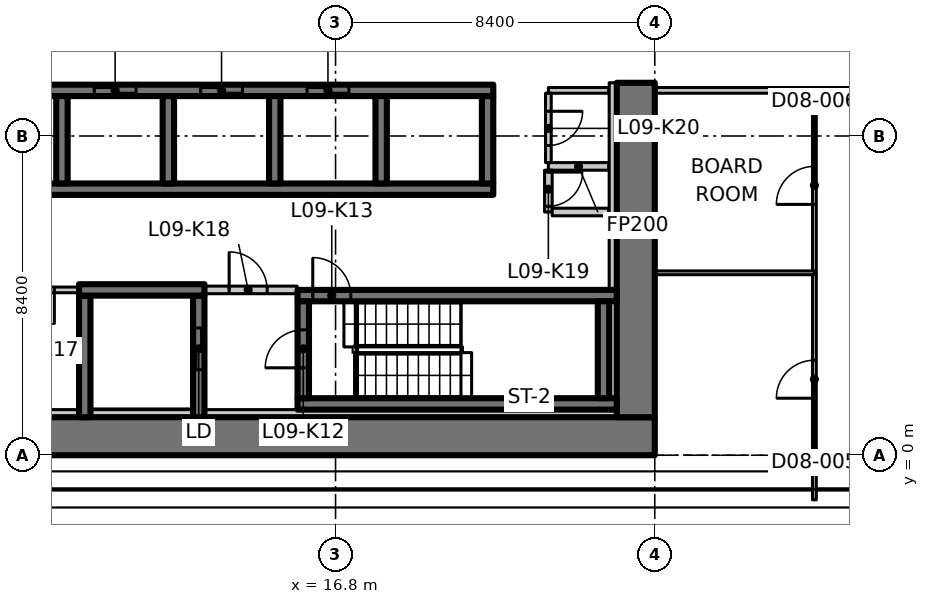
"""IFC4 building model, lengths in metres.
Left out: names, types, materials, properties, quantities, classifications, styles, units other than length and angle.
Written with IfcOpenShell. Run it as: python <this file> out.ifc"""

import sys

from ifc_helpers import new_model, si_unit, direction, frame, frame_2d, origin, place, context, subcontext, project, spatial, polyline, rectangle, outline, extrude, element, fill, save


model = new_model("IFC4")
c1 = context("Model", 3, precision=1e-05, world=origin(), true_north=direction((0.0, 1.0)))
c2 = subcontext(c1, "Body", "Model", "MODEL_VIEW")
j1 = project(units=[si_unit("LENGTHUNIT", "METRE"), si_unit("PLANEANGLEUNIT", "RADIAN")], contexts=[c1])
p1 = place(None, origin())
s1 = spatial("IfcSite", under=j1, at=p1, CompositionType="ELEMENT")
p2 = place(p1, origin())
s2 = spatial("IfcBuilding", under=s1, at=p2, CompositionType="ELEMENT")
p3 = place(p2, frame((0.0, 0.0, 47.3)))
s3 = spatial("IfcBuildingStorey", under=s2, at=p3, CompositionType="ELEMENT", Elevation=47.3)
p4 = place(p3, frame((6.936, 0.5, 0.0), z_axis=(0.0, 0.0, 1.0), x_axis=(1.0, 0.0, 0.0)))
e1 = element("IfcWall", 1, at=p4, inside=s3, PredefinedType="SHEAR", context=c2, shape_type="SweptSolid", body=[
    extrude(rectangle(XDim=18.264, YDim=1.0, at=frame_2d((9.132, 0.0))), origin(), (0.0, 0.0, 1.0), 3.35),
])
p5 = place(p3, frame((24.7, 1.0, 0.0), z_axis=(0.0, 0.0, 1.0), x_axis=(0.0, 1.0, 0.0)))
e2 = element("IfcWall", 2, at=p5, inside=s3, PredefinedType="SHEAR", context=c2, shape_type="SweptSolid", body=[
    extrude(rectangle(XDim=8.8, YDim=1.0, at=frame_2d((4.4, 0.0))), origin(), (0.0, 0.0, 1.0), 3.35),
])
p6 = place(p3, frame((1.0, 7.0, 0.0), z_axis=(0.0, 0.0, 1.0), x_axis=(1.0, 0.0, 0.0)))
e3 = element("IfcWall", 3, at=p6, inside=s3, PredefinedType="SHEAR", context=c2, shape_type="SweptSolid", body=[
    extrude(rectangle(XDim=19.95, YDim=0.3, at=frame_2d((9.975, 0.0))), origin(), (0.0, 0.0, 1.0), 3.35),
])
p7 = place(p3, frame((1.0, 9.6, 0.0), z_axis=(0.0, 0.0, 1.0), x_axis=(1.0, 0.0, 0.0)))
e4 = element("IfcWall", 4, at=p7, inside=s3, PredefinedType="SHEAR", context=c2, shape_type="SweptSolid", body=[
    extrude(rectangle(XDim=19.95, YDim=0.3, at=frame_2d((9.975, 0.0))), origin(), (0.0, 0.0, 1.0), 3.35),
])
p8 = place(p7, frame((1.05, 0.0, 0.0)))
e5 = element("IfcOpeningElement", 5, at=p8, cuts=e4, PredefinedType="OPENING", context=c2, shape_type="SweptSolid", body=[
    extrude(rectangle(XDim=1.1, YDim=2.3, at=frame_2d((0.55, 1.15))), frame((0.0, 0.16, 0.0), z_axis=(0.0, -1.0, 0.0), x_axis=(1.0, 0.0, 0.0)), (0.0, 0.0, 1.0), 0.32),
])
p9 = place(p7, frame((3.85, 0.0, 0.0)))
e6 = element("IfcOpeningElement", 6, at=p9, cuts=e4, PredefinedType="OPENING", context=c2, shape_type="SweptSolid", body=[
    extrude(rectangle(XDim=1.1, YDim=2.3, at=frame_2d((0.55, 1.15))), frame((0.0, 0.16, 0.0), z_axis=(0.0, -1.0, 0.0), x_axis=(1.0, 0.0, 0.0)), (0.0, 0.0, 1.0), 0.32),
])
p10 = place(p7, frame((6.65, 0.0, 0.0)))
e7 = element("IfcOpeningElement", 7, at=p10, cuts=e4, PredefinedType="OPENING", context=c2, shape_type="SweptSolid", body=[
    extrude(rectangle(XDim=1.1, YDim=2.3, at=frame_2d((0.55, 1.15))), frame((0.0, 0.16, 0.0), z_axis=(0.0, -1.0, 0.0), x_axis=(1.0, 0.0, 0.0)), (0.0, 0.0, 1.0), 0.32),
])
p11 = place(p7, frame((9.45, 0.0, 0.0)))
e8 = element("IfcOpeningElement", 8, at=p11, cuts=e4, PredefinedType="OPENING", context=c2, shape_type="SweptSolid", body=[
    extrude(rectangle(XDim=1.1, YDim=2.3, at=frame_2d((0.55, 1.15))), frame((0.0, 0.16, 0.0), z_axis=(0.0, -1.0, 0.0), x_axis=(1.0, 0.0, 0.0)), (0.0, 0.0, 1.0), 0.32),
])
p12 = place(p7, frame((12.25, 0.0, 0.0)))
e9 = element("IfcOpeningElement", 9, at=p12, cuts=e4, PredefinedType="OPENING", context=c2, shape_type="SweptSolid", body=[
    extrude(rectangle(XDim=1.1, YDim=2.3, at=frame_2d((0.55, 1.15))), frame((0.0, 0.16, 0.0), z_axis=(0.0, -1.0, 0.0), x_axis=(1.0, 0.0, 0.0)), (0.0, 0.0, 1.0), 0.32),
])
p13 = place(p7, frame((15.05, 0.0, 0.0)))
e10 = element("IfcOpeningElement", 10, at=p13, cuts=e4, PredefinedType="OPENING", context=c2, shape_type="SweptSolid", body=[
    extrude(rectangle(XDim=1.1, YDim=2.3, at=frame_2d((0.55, 1.15))), frame((0.0, 0.16, 0.0), z_axis=(0.0, -1.0, 0.0), x_axis=(1.0, 0.0, 0.0)), (0.0, 0.0, 1.0), 0.32),
])
for number, where, z_axis, x_axis in (
    (11, (9.6, 7.15, 0.0), (0.0, 0.0, 1.0), (0.0, 1.0, 0.0)),
    (12, (12.4, 7.15, 0.0), (0.0, 0.0, 1.0), (0.0, 1.0, 0.0)),
    (13, (15.2, 7.15, 0.0), (0.0, 0.0, 1.0), (0.0, 1.0, 0.0)),
    (14, (18.0, 7.15, 0.0), (0.0, 0.0, 1.0), (0.0, 1.0, 0.0)),
    (15, (20.8, 7.15, 0.0), (0.0, 0.0, 1.0), (0.0, 1.0, 0.0)),
):
    element("IfcWall", number, at=place(p3, frame(where, z_axis=z_axis, x_axis=x_axis)), inside=s3, PredefinedType="SHEAR", context=c2, shape_type="SweptSolid", body=[
        extrude(rectangle(XDim=2.3, YDim=0.3, at=frame_2d((1.15, 0.0))), origin(), (0.0, 0.0, 1.0), 3.35),
    ])
p14 = place(p3, frame((10.2, 1.0, 0.0), z_axis=(0.0, 0.0, 1.0), x_axis=(0.0, 1.0, 0.0)))
e16 = element("IfcWall", 16, at=p14, inside=s3, PredefinedType="SHEAR", context=c2, shape_type="SweptSolid", body=[
    extrude(rectangle(XDim=3.2, YDim=0.3, at=frame_2d((1.6, 0.0))), origin(), (0.0, 0.0, 1.0), 3.35),
])
p15 = place(p3, frame((13.2, 1.0, 0.0), z_axis=(0.0, 0.0, 1.0), x_axis=(0.0, 1.0, 0.0)))
e17 = element("IfcWall", 17, at=p15, inside=s3, PredefinedType="SHEAR", context=c2, shape_type="SweptSolid", body=[
    extrude(rectangle(XDim=3.2, YDim=0.3, at=frame_2d((1.6, 0.0))), origin(), (0.0, 0.0, 1.0), 3.35),
])
p16 = place(p15, frame((1.25, 0.0, 0.0)))
e18 = element("IfcOpeningElement", 18, at=p16, cuts=e17, PredefinedType="OPENING", context=c2, shape_type="SweptSolid", body=[
    extrude(rectangle(XDim=1.1, YDim=2.3, at=frame_2d((0.55, 1.15))), frame((0.0, 0.16, 0.0), z_axis=(0.0, -1.0, 0.0), x_axis=(1.0, 0.0, 0.0)), (0.0, 0.0, 1.0), 0.32),
])
p17 = place(p3, frame((10.05, 4.35, 0.0), z_axis=(0.0, 0.0, 1.0), x_axis=(1.0, 0.0, 0.0)))
e19 = element("IfcWall", 19, at=p17, inside=s3, PredefinedType="SHEAR", context=c2, shape_type="SweptSolid", body=[
    extrude(rectangle(XDim=3.3, YDim=0.3, at=frame_2d((1.65, 0.0))), origin(), (0.0, 0.0, 1.0), 3.35),
])
p18 = place(p3, frame((15.8, 1.35, 0.0), z_axis=(0.0, 0.0, 1.0), x_axis=(1.0, 0.0, 0.0)))
e20 = element("IfcWall", 20, at=p18, inside=s3, PredefinedType="SHEAR", context=c2, shape_type="SweptSolid", body=[
    extrude(rectangle(XDim=8.4, YDim=0.3, at=frame_2d((4.2, 0.0))), origin(), (0.0, 0.0, 1.0), 3.35),
])
p19 = place(p3, frame((15.8, 4.2, 0.0), z_axis=(0.0, 0.0, 1.0), x_axis=(1.0, 0.0, 0.0)))
e21 = element("IfcWall", 21, at=p19, inside=s3, PredefinedType="SHEAR", context=c2, shape_type="SweptSolid", body=[
    extrude(rectangle(XDim=8.4, YDim=0.3, at=frame_2d((4.2, 0.0))), origin(), (0.0, 0.0, 1.0), 3.35),
])
p20 = place(p19, frame((0.4, 0.0, 0.0)))
e22 = element("IfcOpeningElement", 22, at=p20, cuts=e21, PredefinedType="OPENING", context=c2, shape_type="SweptSolid", body=[
    extrude(rectangle(XDim=1.0, YDim=2.1, at=frame_2d((0.5, 1.05))), frame((0.0, 0.16, 0.0), z_axis=(0.0, -1.0, 0.0), x_axis=(1.0, 0.0, 0.0)), (0.0, 0.0, 1.0), 0.32),
])
p21 = place(p3, frame((15.95, 1.5, 0.0), z_axis=(0.0, 0.0, 1.0), x_axis=(0.0, 1.0, 0.0)))
e23 = element("IfcWall", 23, at=p21, inside=s3, PredefinedType="SHEAR", context=c2, shape_type="SweptSolid", body=[
    extrude(rectangle(XDim=2.55, YDim=0.3, at=frame_2d((1.275, 0.0))), origin(), (0.0, 0.0, 1.0), 3.35),
])
p22 = place(p21, frame((0.8, 0.0, 0.0)))
e24 = element("IfcOpeningElement", 24, at=p22, cuts=e23, PredefinedType="OPENING", context=c2, shape_type="SweptSolid", body=[
    extrude(rectangle(XDim=1.0, YDim=2.1, at=frame_2d((0.5, 1.05))), frame((0.0, 0.16, 0.0), z_axis=(0.0, -1.0, 0.0), x_axis=(1.0, 0.0, 0.0)), (0.0, 0.0, 1.0), 0.32),
])
p23 = place(p3, frame((23.85, 1.5, 0.0), z_axis=(0.0, 0.0, 1.0), x_axis=(0.0, 1.0, 0.0)))
e25 = element("IfcWall", 25, at=p23, inside=s3, PredefinedType="SHEAR", context=c2, shape_type="SweptSolid", body=[
    extrude(rectangle(XDim=2.55, YDim=0.3, at=frame_2d((1.275, 0.0))), origin(), (0.0, 0.0, 1.0), 3.35),
])
p24 = place(p3, frame((13.362, 4.35, 0.0), z_axis=(0.0, 0.0, 1.0), x_axis=(1.0, 0.0, 0.0)))
e26 = element("IfcWall", 26, at=p24, inside=s3, PredefinedType="PARTITIONING", context=c2, shape_type="SweptSolid", body=[
    extrude(rectangle(XDim=2.426, YDim=0.2, at=frame_2d((1.213, 0.0))), origin(), (0.0, 0.0, 1.0), 3.35),
])
p25 = place(p24, frame((0.638, 0.0, 0.0)))
e27 = element("IfcOpeningElement", 27, at=p25, cuts=e26, PredefinedType="OPENING", context=c2, shape_type="SweptSolid", body=[
    extrude(rectangle(XDim=1.0, YDim=2.1, at=frame_2d((0.5, 1.05))), frame((0.0, 0.11, 0.0), z_axis=(0.0, -1.0, 0.0), x_axis=(1.0, 0.0, 0.0)), (0.0, 0.0, 1.0), 0.22),
])
p26 = place(p3, frame((23.988, 7.6, 0.0), z_axis=(0.0, 0.0, 1.0), x_axis=(-1.0, 0.0, 0.0)))
e28 = element("IfcWall", 28, at=p26, inside=s3, PredefinedType="PARTITIONING", context=c2, shape_type="SweptSolid", body=[
    extrude(rectangle(XDim=1.588, YDim=0.2, at=frame_2d((0.794, 0.0))), origin(), (0.0, 0.0, 1.0), 3.35),
])
p27 = place(p3, frame((22.4, 7.5, 0.0), z_axis=(0.0, 0.0, 1.0), x_axis=(0.0, -1.0, 0.0)))
e29 = element("IfcWall", 29, at=p27, inside=s3, PredefinedType="PARTITIONING", context=c2, shape_type="SweptSolid", body=[
    extrude(rectangle(XDim=1.1, YDim=0.2, at=frame_2d((0.55, 0.0))), origin(), (0.0, 0.0, 1.0), 3.35),
])
p28 = place(p27, frame((0.05, 0.0, 0.0)))
e30 = element("IfcOpeningElement", 30, at=p28, cuts=e29, PredefinedType="OPENING", context=c2, shape_type="SweptSolid", body=[
    extrude(rectangle(XDim=0.9, YDim=2.1, at=frame_2d((0.45, 1.05))), frame((0.0, 0.11, 0.0), z_axis=(0.0, -1.0, 0.0), x_axis=(1.0, 0.0, 0.0)), (0.0, 0.0, 1.0), 0.22),
])
p29 = place(p3, frame((22.5, 6.4, 0.0), z_axis=(0.0, 0.0, 1.0), x_axis=(1.0, 0.0, 0.0)))
e31 = element("IfcWall", 31, at=p29, inside=s3, PredefinedType="PARTITIONING", context=c2, shape_type="SweptSolid", body=[
    extrude(rectangle(XDim=1.488, YDim=0.2, at=frame_2d((0.744, 0.0))), origin(), (0.0, 0.0, 1.0), 3.35),
])
p30 = place(p3, frame((10.038, 4.35, 0.0), z_axis=(0.0, 0.0, 1.0), x_axis=(-1.0, 0.0, 0.0)))
e32 = element("IfcWall", 32, at=p30, inside=s3, PredefinedType="PARTITIONING", context=c2, shape_type="SweptSolid", body=[
    extrude(rectangle(XDim=2.263, YDim=0.15, at=frame_2d((1.132, 0.0))), origin(), (0.0, 0.0, 1.0), 3.35),
])
p31 = place(p30, frame((0.638, 0.0, 0.0)))
e33 = element("IfcOpeningElement", 33, at=p31, cuts=e32, PredefinedType="OPENING", context=c2, shape_type="SweptSolid", body=[
    extrude(rectangle(XDim=0.9, YDim=2.1, at=frame_2d((0.45, 1.05))), frame((0.0, 0.085, 0.0), z_axis=(0.0, -1.0, 0.0), x_axis=(1.0, 0.0, 0.0)), (0.0, 0.0, 1.0), 0.17),
])
p32 = place(p3, frame((23.988, 9.6, 0.0), z_axis=(0.0, 0.0, 1.0), x_axis=(-1.0, 0.0, 0.0)))
e34 = element("IfcWall", 34, at=p32, inside=s3, PredefinedType="PARTITIONING", context=c2, shape_type="SweptSolid", body=[
    extrude(rectangle(XDim=1.588, YDim=0.15, at=frame_2d((0.794, 0.0))), origin(), (0.0, 0.0, 1.0), 3.35),
])
p33 = place(p3, frame((22.4, 9.525, 0.0), z_axis=(0.0, 0.0, 1.0), x_axis=(0.0, -1.0, 0.0)))
e35 = element("IfcWall", 35, at=p33, inside=s3, PredefinedType="PARTITIONING", context=c2, shape_type="SweptSolid", body=[
    extrude(rectangle(XDim=1.825, YDim=0.15, at=frame_2d((0.913, 0.0))), origin(), (0.0, 0.0, 1.0), 3.35),
])
p34 = place(p33, frame((0.475, 0.0, 0.0)))
e36 = element("IfcOpeningElement", 36, at=p34, cuts=e35, PredefinedType="OPENING", context=c2, shape_type="SweptSolid", body=[
    extrude(rectangle(XDim=0.9, YDim=2.1, at=frame_2d((0.45, 1.05))), frame((0.0, 0.085, 0.0), z_axis=(0.0, -1.0, 0.0), x_axis=(1.0, 0.0, 0.0)), (0.0, 0.0, 1.0), 0.17),
])
p35 = place(p3, frame((6.936, 1.1, 0.0), z_axis=(0.0, 0.0, 1.0), x_axis=(1.0, 0.0, 0.0)))
e37 = element("IfcWall", 37, at=p35, inside=s3, PredefinedType="PARTITIONING", context=c2, shape_type="SweptSolid", body=[
    extrude(rectangle(XDim=3.114, YDim=0.2, at=frame_2d((1.557, 0.0))), origin(), (0.0, 0.0, 1.0), 3.35),
])
p36 = place(p3, frame((10.35, 1.1, 0.0), z_axis=(0.0, 0.0, 1.0), x_axis=(1.0, 0.0, 0.0)))
e38 = element("IfcWall", 38, at=p36, inside=s3, PredefinedType="PARTITIONING", context=c2, shape_type="SweptSolid", body=[
    extrude(rectangle(XDim=2.7, YDim=0.2, at=frame_2d((1.35, 0.0))), origin(), (0.0, 0.0, 1.0), 3.35),
])
p37 = place(p3, frame((13.35, 1.1, 0.0), z_axis=(0.0, 0.0, 1.0), x_axis=(1.0, 0.0, 0.0)))
e39 = element("IfcWall", 39, at=p37, inside=s3, PredefinedType="PARTITIONING", context=c2, shape_type="SweptSolid", body=[
    extrude(rectangle(XDim=10.85, YDim=0.2, at=frame_2d((5.425, 0.0))), origin(), (0.0, 0.0, 1.0), 3.35),
])
p38 = place(p3, frame((24.1, 1.5, 0.0), z_axis=(0.0, 0.0, 1.0), x_axis=(0.0, 1.0, 0.0)))
e40 = element("IfcWall", 40, at=p38, inside=s3, PredefinedType="PARTITIONING", context=c2, shape_type="SweptSolid", body=[
    extrude(rectangle(XDim=2.55, YDim=0.2, at=frame_2d((1.275, 0.0))), origin(), (0.0, 0.0, 1.0), 3.35),
])
p39 = place(p3, frame((24.1, 4.35, 0.0), z_axis=(0.0, 0.0, 1.0), x_axis=(0.0, 1.0, 0.0)))
e41 = element("IfcWall", 41, at=p39, inside=s3, PredefinedType="PARTITIONING", context=c2, shape_type="SweptSolid", body=[
    extrude(rectangle(XDim=5.45, YDim=0.2, at=frame_2d((2.725, 0.0))), origin(), (0.0, 0.0, 1.0), 3.35),
])
p40 = place(p3, frame((29.4, 9.6, 0.0), z_axis=(0.0, 0.0, 1.0), x_axis=(-1.0, 0.0, 0.0)))
e42 = element("IfcWall", 42, at=p40, inside=s3, PredefinedType="PARTITIONING", context=c2, shape_type="SweptSolid", body=[
    extrude(rectangle(XDim=4.2, YDim=0.15, at=frame_2d((2.1, 0.0))), origin(), (0.0, 0.0, 1.0), 3.33),
])
p41 = place(p3, frame((37.8, 9.6, 0.0), z_axis=(0.0, 0.0, 1.0), x_axis=(-1.0, 0.0, 0.0)))
e43 = element("IfcWall", 43, at=p41, inside=s3, PredefinedType="PARTITIONING", context=c2, shape_type="SweptSolid", body=[
    extrude(rectangle(XDim=8.4, YDim=0.15, at=frame_2d((4.2, 0.0))), origin(), (0.0, 0.0, 1.0), 3.33),
])
p42 = place(p41, frame((1.8, 0.0, 0.0)))
e44 = element("IfcOpeningElement", 44, at=p42, cuts=e43, PredefinedType="OPENING", context=c2, shape_type="SweptSolid", body=[
    extrude(rectangle(XDim=1.6, YDim=2.1, at=frame_2d((0.8, 1.05))), frame((0.0, 0.085, 0.0), z_axis=(0.0, -1.0, 0.0), x_axis=(1.0, 0.0, 0.0)), (0.0, 0.0, 1.0), 0.17),
])
p43 = place(p3, frame((29.4, -1.174, 0.0), z_axis=(0.0, 0.0, 1.0), x_axis=(0.0, 1.0, 0.0)))
e45 = element("IfcWall", 45, at=p43, inside=s3, PredefinedType="PARTITIONING", context=c2, shape_type="SweptSolid", body=[
    extrude(outline(polyline([(0.0, 0.0), (5.974, 0.0), (5.974, 3.33), (1.624, 3.33), (1.622, 2.98), (0.726, 2.98), (0.724, 3.33), (0.074, 3.33), (0.0, 3.33), (0.0, 0.0)])), frame((0.0, 0.05, 0.0), z_axis=(0.0, -1.0, 0.0), x_axis=(1.0, 0.0, 0.0)), (0.0, 0.0, 1.0), 0.1),
])
p44 = place(p43, frame((2.674, 0.0, 0.0)))
e46 = element("IfcOpeningElement", 46, at=p44, cuts=e45, PredefinedType="OPENING", context=c2, shape_type="SweptSolid", body=[
    extrude(rectangle(XDim=1.0, YDim=2.1, at=frame_2d((0.5, 1.05))), frame((0.0, 0.06, 0.0), z_axis=(0.0, -1.0, 0.0), x_axis=(1.0, 0.0, 0.0)), (0.0, 0.0, 1.0), 0.12),
])
p45 = place(p3, frame((29.4, 4.8, 0.0), z_axis=(0.0, 0.0, 1.0), x_axis=(0.0, 1.0, 0.0)))
e47 = element("IfcWall", 47, at=p45, inside=s3, PredefinedType="PARTITIONING", context=c2, shape_type="SweptSolid", body=[
    extrude(rectangle(XDim=4.8, YDim=0.1, at=frame_2d((2.4, 0.0))), origin(), (0.0, 0.0, 1.0), 3.33),
])
p46 = place(p45, frame((1.8, 0.0, 0.0)))
e48 = element("IfcOpeningElement", 48, at=p46, cuts=e47, PredefinedType="OPENING", context=c2, shape_type="SweptSolid", body=[
    extrude(rectangle(XDim=1.0, YDim=2.1, at=frame_2d((0.5, 1.05))), frame((0.0, 0.06, 0.0), z_axis=(0.0, -1.0, 0.0), x_axis=(1.0, 0.0, 0.0)), (0.0, 0.0, 1.0), 0.12),
])
p47 = place(p3, frame((25.2, 4.8, 0.0), z_axis=(0.0, 0.0, 1.0), x_axis=(1.0, 0.0, 0.0)))
e49 = element("IfcWall", 49, at=p47, inside=s3, PredefinedType="PARTITIONING", context=c2, shape_type="SweptSolid", body=[
    extrude(rectangle(XDim=4.2, YDim=0.1, at=frame_2d((2.1, 0.0))), origin(), (0.0, 0.0, 1.0), 3.33),
])
p48 = place(p11, origin())
e50 = element("IfcDoor", 50, at=p48, inside=s3, OperationType="SLIDING_TO_LEFT", PredefinedType="DOOR", context=c2, shape_type="SweptSolid", body=[
    extrude(rectangle(XDim=1.1, YDim=2.3, at=frame_2d((0.55, 1.15))), frame((0.0, 0.025, 0.0), z_axis=(0.0, -1.0, 0.0), x_axis=(1.0, 0.0, 0.0)), (0.0, 0.0, 1.0), 0.05),
])
fill(e8, e50)
p49 = place(p12, origin())
e51 = element("IfcDoor", 51, at=p49, inside=s3, OperationType="SLIDING_TO_LEFT", PredefinedType="DOOR", context=c2, shape_type="SweptSolid", body=[
    extrude(rectangle(XDim=1.1, YDim=2.3, at=frame_2d((0.55, 1.15))), frame((0.0, 0.025, 0.0), z_axis=(0.0, -1.0, 0.0), x_axis=(1.0, 0.0, 0.0)), (0.0, 0.0, 1.0), 0.05),
])
fill(e9, e51)
p50 = place(p13, origin())
e52 = element("IfcDoor", 52, at=p50, inside=s3, OperationType="SLIDING_TO_LEFT", PredefinedType="DOOR", context=c2, shape_type="SweptSolid", body=[
    extrude(rectangle(XDim=1.1, YDim=2.3, at=frame_2d((0.55, 1.15))), frame((0.0, 0.025, 0.0), z_axis=(0.0, -1.0, 0.0), x_axis=(1.0, 0.0, 0.0)), (0.0, 0.0, 1.0), 0.05),
])
fill(e10, e52)
p51 = place(p16, origin())
e53 = element("IfcDoor", 53, at=p51, inside=s3, OperationType="SLIDING_TO_LEFT", PredefinedType="DOOR", context=c2, shape_type="SweptSolid", body=[
    extrude(rectangle(XDim=1.1, YDim=2.3, at=frame_2d((0.55, 1.15))), frame((0.0, 0.025, 0.0), z_axis=(0.0, -1.0, 0.0), x_axis=(1.0, 0.0, 0.0)), (0.0, 0.0, 1.0), 0.05),
])
fill(e18, e53)
p52 = place(p22, origin())
e54 = element("IfcDoor", 54, at=p52, inside=s3, OperationType="SINGLE_SWING_LEFT", PredefinedType="DOOR", context=c2, shape_type="SweptSolid", body=[
    extrude(rectangle(XDim=1.0, YDim=2.1, at=frame_2d((0.5, 1.05))), frame((0.0, 0.025, 0.0), z_axis=(0.0, -1.0, 0.0), x_axis=(1.0, 0.0, 0.0)), (0.0, 0.0, 1.0), 0.05),
])
fill(e24, e54)
p53 = place(p20, origin())
e55 = element("IfcDoor", 55, at=p53, inside=s3, OperationType="SINGLE_SWING_RIGHT", PredefinedType="DOOR", context=c2, shape_type="SweptSolid", body=[
    extrude(rectangle(XDim=1.0, YDim=2.1, at=frame_2d((0.5, 1.05))), frame((0.0, 0.025, 0.0), z_axis=(0.0, -1.0, 0.0), x_axis=(1.0, 0.0, 0.0)), (0.0, 0.0, 1.0), 0.05),
])
fill(e22, e55)
p54 = place(p31, origin())
e56 = element("IfcDoor", 56, at=p54, inside=s3, OperationType="SINGLE_SWING_RIGHT", PredefinedType="DOOR", context=c2, shape_type="SweptSolid", body=[
    extrude(rectangle(XDim=0.9, YDim=2.1, at=frame_2d((0.45, 1.05))), frame((0.0, 0.025, 0.0), z_axis=(0.0, -1.0, 0.0), x_axis=(1.0, 0.0, 0.0)), (0.0, 0.0, 1.0), 0.05),
])
fill(e33, e56)
p55 = place(p25, origin())
e57 = element("IfcDoor", 57, at=p55, inside=s3, OperationType="SINGLE_SWING_LEFT", PredefinedType="DOOR", context=c2, shape_type="SweptSolid", body=[
    extrude(rectangle(XDim=1.0, YDim=2.1, at=frame_2d((0.5, 1.05))), frame((0.0, 0.025, 0.0), z_axis=(0.0, -1.0, 0.0), x_axis=(1.0, 0.0, 0.0)), (0.0, 0.0, 1.0), 0.05),
])
fill(e27, e57)
p56 = place(p28, origin())
e58 = element("IfcDoor", 58, at=p56, inside=s3, OperationType="SINGLE_SWING_RIGHT", PredefinedType="DOOR", context=c2, shape_type="SweptSolid", body=[
    extrude(rectangle(XDim=0.9, YDim=2.1, at=frame_2d((0.45, 1.05))), frame((0.0, 0.025, 0.0), z_axis=(0.0, -1.0, 0.0), x_axis=(1.0, 0.0, 0.0)), (0.0, 0.0, 1.0), 0.05),
])
fill(e30, e58)
p57 = place(p34, origin())
e59 = element("IfcDoor", 59, at=p57, inside=s3, OperationType="SINGLE_SWING_LEFT", PredefinedType="DOOR", context=c2, shape_type="SweptSolid", body=[
    extrude(rectangle(XDim=0.9, YDim=2.1, at=frame_2d((0.45, 1.05))), frame((0.0, 0.025, 0.0), z_axis=(0.0, -1.0, 0.0), x_axis=(1.0, 0.0, 0.0)), (0.0, 0.0, 1.0), 0.05),
])
fill(e36, e59)
p58 = place(p44, origin())
e60 = element("IfcDoor", 60, at=p58, inside=s3, OperationType="SINGLE_SWING_LEFT", PredefinedType="DOOR", context=c2, shape_type="SweptSolid", body=[
    extrude(rectangle(XDim=1.0, YDim=2.1, at=frame_2d((0.5, 1.05))), frame((0.0, 0.025, 0.0), z_axis=(0.0, -1.0, 0.0), x_axis=(1.0, 0.0, 0.0)), (0.0, 0.0, 1.0), 0.05),
])
fill(e46, e60)
p59 = place(p46, origin())
e61 = element("IfcDoor", 61, at=p59, inside=s3, OperationType="SINGLE_SWING_LEFT", PredefinedType="DOOR", context=c2, shape_type="SweptSolid", body=[
    extrude(rectangle(XDim=1.0, YDim=2.1, at=frame_2d((0.5, 1.05))), frame((0.0, 0.025, 0.0), z_axis=(0.0, -1.0, 0.0), x_axis=(1.0, 0.0, 0.0)), (0.0, 0.0, 1.0), 0.05),
])
fill(e48, e61)
save(model, sys.argv[1])
